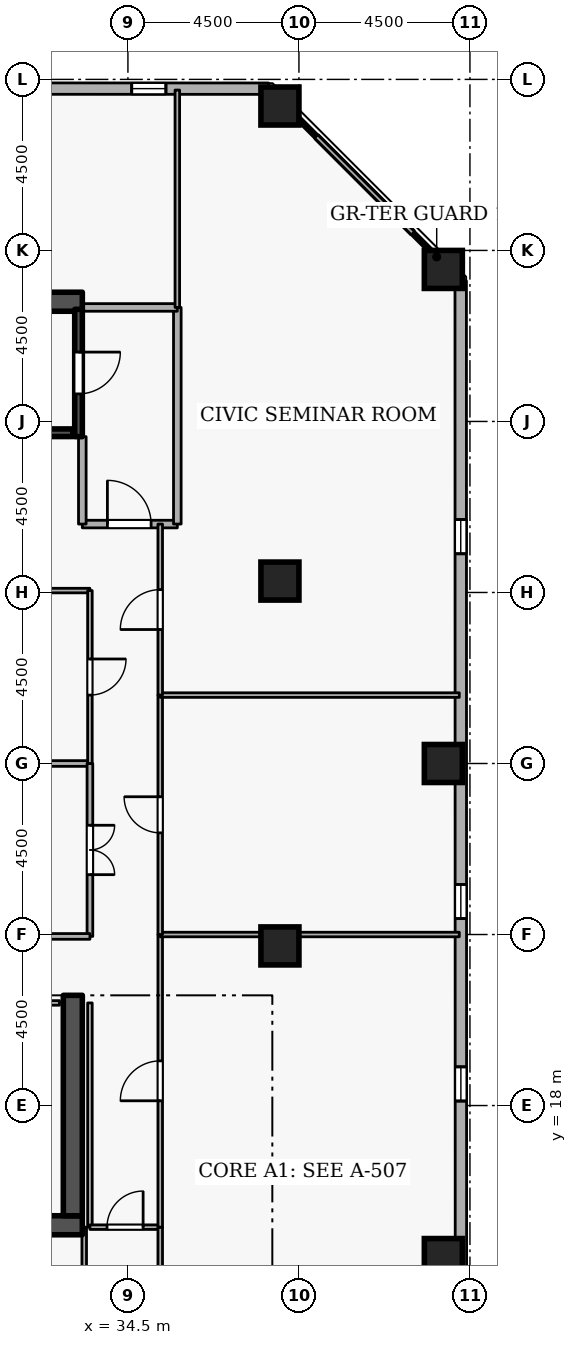
"""IFC4 building model, lengths in metres.
Left out: names, types, materials, properties, quantities, classifications, styles, units other than length and angle.
Written with IfcOpenShell. Run it as: python <this file> out.ifc"""

import sys

from ifc_helpers import new_model, si_unit, direction, frame, frame_2d, origin, origin_2d, place, context, subcontext, project, spatial, rectangle, extrude, element, fill, save


model = new_model("IFC4")
c1 = context("Model", 3, precision=1e-05, world=origin(), true_north=direction((0.0, 1.0)))
c2 = subcontext(c1, "Body", "Model", "MODEL_VIEW")
j1 = project(units=[si_unit("LENGTHUNIT", "METRE"), si_unit("PLANEANGLEUNIT", "RADIAN")], contexts=[c1])
p1 = place(None, origin())
s1 = spatial("IfcSite", under=j1, at=p1, CompositionType="ELEMENT")
p2 = place(p1, origin())
s2 = spatial("IfcBuilding", under=s1, at=p2, CompositionType="ELEMENT")
p3 = place(p2, frame((0.0, 0.0, 243.9)))
s3 = spatial("IfcBuildingStorey", under=s2, at=p3, CompositionType="ELEMENT", Elevation=243.9)
p4 = place(p3, frame((17.7, 14.85, 0.0), z_axis=(0.0, 0.0, 1.0), x_axis=(1.0, 0.0, 0.0)))
e1 = element("IfcWall", 1, at=p4, inside=s3, PredefinedType="SHEAR", context=c2, shape_type="SweptSolid", body=[
    extrude(rectangle(XDim=15.6, YDim=0.5, at=frame_2d((7.8, 0.0))), origin(), (0.0, 0.0, 1.0), 3.6),
])
p5 = place(p3, frame((33.05, 15.1, 0.0), z_axis=(0.0, 0.0, 1.0), x_axis=(0.0, 1.0, 0.0)))
e2 = element("IfcWall", 2, at=p5, inside=s3, PredefinedType="SHEAR", context=c2, shape_type="SweptSolid", body=[
    extrude(rectangle(XDim=5.8, YDim=0.5, at=frame_2d((2.9, 0.0))), origin(), (0.0, 0.0, 1.0), 3.6),
])
p6 = place(p3, frame((17.7, 39.15, 0.0), z_axis=(0.0, 0.0, 1.0), x_axis=(1.0, 0.0, 0.0)))
e3 = element("IfcWall", 3, at=p6, inside=s3, PredefinedType="SHEAR", context=c2, shape_type="SweptSolid", body=[
    extrude(rectangle(XDim=15.6, YDim=0.5, at=frame_2d((7.8, 0.0))), origin(), (0.0, 0.0, 1.0), 3.6),
])
for number, where, z_axis, x_axis in (
    (4, (42.8, 14.0, 0.0), (0.0, 0.0, 1.0), (1.0, 0.0, 0.0)),
    (5, (42.8, 27.0, 0.0), (0.0, 0.0, 1.0), (1.0, 0.0, 0.0)),
    (6, (42.8, 40.0, 0.0), (0.0, 0.0, 1.0), (1.0, 0.0, 0.0)),
    (7, (38.5, 44.3, 0.0), (0.0, 0.0, 1.0), (1.0, 0.0, 0.0)),
    (8, (38.5, 22.2, 0.0), (0.0, 0.0, 1.0), (1.0, 0.0, 0.0)),
    (9, (38.5, 31.8, 0.0), (0.0, 0.0, 1.0), (1.0, 0.0, 0.0)),
):
    element("IfcColumn", number, at=place(p3, frame(where, z_axis=z_axis, x_axis=x_axis)), inside=s3, PredefinedType="COLUMN", context=c2, shape_type="SweptSolid", body=[
        extrude(rectangle(XDim=1.0, YDim=1.0, at=origin_2d()), origin(), (0.0, 0.0, 1.0), 3.6),
    ])
p7 = place(p3, frame((43.265, 5.819, 0.0), z_axis=(0.0, 0.0, 1.0), x_axis=(-0.000244999128, 0.999999969988, 0.0)))
e10 = element("IfcWall", 10, at=p7, inside=s3, PredefinedType="STANDARD", context=c2, shape_type="SweptSolid", body=[
    extrude(rectangle(XDim=33.881, YDim=0.3, at=frame_2d((16.94, 0.0))), origin(), (0.0, 0.0, 1.0), 2.7),
])
p8 = place(p7, frame((2.7, 0.0, 0.72)))
e11 = element("IfcOpeningElement", 11, at=p8, cuts=e10, PredefinedType="OPENING", context=c2, shape_type="SweptSolid", body=[
    extrude(rectangle(XDim=0.9, YDim=1.75, at=frame_2d((0.45, 0.875))), frame((0.0, 0.16, 0.0), z_axis=(0.0, -1.0, 0.0), x_axis=(1.0, 0.0, 0.0)), (0.0, 0.0, 1.0), 0.32),
])
p9 = place(p7, frame((12.3, 0.0, 0.72)))
e12 = element("IfcOpeningElement", 12, at=p9, cuts=e10, PredefinedType="OPENING", context=c2, shape_type="SweptSolid", body=[
    extrude(rectangle(XDim=0.9, YDim=1.75, at=frame_2d((0.45, 0.875))), frame((0.0, 0.16, 0.0), z_axis=(0.0, -1.0, 0.0), x_axis=(1.0, 0.0, 0.0)), (0.0, 0.0, 1.0), 0.32),
])
p10 = place(p7, frame((17.1, 0.0, 0.72)))
e13 = element("IfcOpeningElement", 13, at=p10, cuts=e10, PredefinedType="OPENING", context=c2, shape_type="SweptSolid", body=[
    extrude(rectangle(XDim=0.9, YDim=1.75, at=frame_2d((0.45, 0.875))), frame((0.0, 0.16, 0.0), z_axis=(0.0, -1.0, 0.0), x_axis=(1.0, 0.0, 0.0)), (0.0, 0.0, 1.0), 0.32),
])
p11 = place(p7, frame((26.7, 0.0, 0.72)))
e14 = element("IfcOpeningElement", 14, at=p11, cuts=e10, PredefinedType="OPENING", context=c2, shape_type="SweptSolid", body=[
    extrude(rectangle(XDim=0.9, YDim=1.75, at=frame_2d((0.45, 0.875))), frame((0.0, 0.16, 0.0), z_axis=(0.0, -1.0, 0.0), x_axis=(1.0, 0.0, 0.0)), (0.0, 0.0, 1.0), 0.32),
])
p12 = place(p3, frame((38.199, 44.756, 0.0), z_axis=(0.0, 0.0, 1.0), x_axis=(-0.999999969988, 0.000244999128, 0.0)))
e15 = element("IfcWall", 15, at=p12, inside=s3, PredefinedType="STANDARD", context=c2, shape_type="SweptSolid", body=[
    extrude(rectangle(XDim=33.881, YDim=0.3, at=frame_2d((16.94, 0.0))), origin(), (0.0, 0.0, 1.0), 2.7),
])
p13 = place(p12, frame((2.7, 0.0, 0.72)))
e16 = element("IfcOpeningElement", 16, at=p13, cuts=e15, PredefinedType="OPENING", context=c2, shape_type="SweptSolid", body=[
    extrude(rectangle(XDim=0.9, YDim=1.75, at=frame_2d((0.45, 0.875))), frame((0.0, 0.16, 0.0), z_axis=(0.0, -1.0, 0.0), x_axis=(1.0, 0.0, 0.0)), (0.0, 0.0, 1.0), 0.32),
])
p14 = place(p12, frame((7.5, 0.0, 0.72)))
e17 = element("IfcOpeningElement", 17, at=p14, cuts=e15, PredefinedType="OPENING", context=c2, shape_type="SweptSolid", body=[
    extrude(rectangle(XDim=0.9, YDim=1.75, at=frame_2d((0.45, 0.875))), frame((0.0, 0.16, 0.0), z_axis=(0.0, -1.0, 0.0), x_axis=(1.0, 0.0, 0.0)), (0.0, 0.0, 1.0), 0.32),
])
p15 = place(p12, frame((17.1, 0.0, 0.72)))
e18 = element("IfcOpeningElement", 18, at=p15, cuts=e15, PredefinedType="OPENING", context=c2, shape_type="SweptSolid", body=[
    extrude(rectangle(XDim=0.9, YDim=1.75, at=frame_2d((0.45, 0.875))), frame((0.0, 0.16, 0.0), z_axis=(0.0, -1.0, 0.0), x_axis=(1.0, 0.0, 0.0)), (0.0, 0.0, 1.0), 0.32),
])
p16 = place(p3, frame((33.2, 38.95, 0.0), z_axis=(0.0, 0.0, 1.0), x_axis=(0.0, -1.0, 0.0)))
e19 = element("IfcWall", 19, at=p16, inside=s3, PredefinedType="SHEAR", context=c2, shape_type="SweptSolid", body=[
    extrude(rectangle(XDim=3.35, YDim=0.2, at=frame_2d((1.675, 0.0))), origin(), (0.0, 0.0, 1.0), 3.6),
])
p17 = place(p16, frame((1.125, 0.0, 0.0)))
e20 = element("IfcOpeningElement", 20, at=p17, cuts=e19, PredefinedType="OPENING", context=c2, shape_type="SweptSolid", body=[
    extrude(rectangle(XDim=1.1, YDim=2.1, at=frame_2d((0.55, 1.05))), frame((0.0, 0.11, 0.0), z_axis=(0.0, -1.0, 0.0), x_axis=(1.0, 0.0, 0.0)), (0.0, 0.0, 1.0), 0.22),
])
p18 = place(p3, frame((25.95, 35.703, 0.0), z_axis=(0.0, 0.0, 1.0), x_axis=(1.0, 0.0, 0.0)))
e21 = element("IfcWall", 21, at=p18, inside=s3, PredefinedType="SHEAR", context=c2, shape_type="SweptSolid", body=[
    extrude(rectangle(XDim=7.1, YDim=0.2, at=frame_2d((3.55, 0.0))), origin(), (0.0, 0.0, 1.0), 3.6),
])
p19 = place(p3, frame((33.3, 33.3, 0.0), z_axis=(0.0, 0.0, 1.0), x_axis=(1.0, 0.0, 0.0)))
e22 = element("IfcWall", 22, at=p19, inside=s3, PredefinedType="STANDARD", context=c2, shape_type="SweptSolid", body=[
    extrude(rectangle(XDim=2.5, YDim=0.2, at=frame_2d((1.25, 0.0))), origin(), (0.0, 0.0, 1.0), 3.34),
])
p20 = place(p19, frame((0.66, 0.0, 0.0)))
e23 = element("IfcOpeningElement", 23, at=p20, cuts=e22, PredefinedType="OPENING", context=c2, shape_type="SweptSolid", body=[
    extrude(rectangle(XDim=1.15, YDim=2.1, at=frame_2d((0.575, 1.05))), frame((0.0, 0.11, 0.0), z_axis=(0.0, -1.0, 0.0), x_axis=(1.0, 0.0, 0.0)), (0.0, 0.0, 1.0), 0.22),
])
p21 = place(p3, frame((35.8, 33.3, 0.0), z_axis=(0.0, 0.0, 1.0), x_axis=(0.0, 1.0, 0.0)))
e24 = element("IfcWall", 24, at=p21, inside=s3, PredefinedType="STANDARD", context=c2, shape_type="SweptSolid", body=[
    extrude(rectangle(XDim=5.7, YDim=0.2, at=frame_2d((2.85, 0.0))), origin(), (0.0, 0.0, 1.0), 3.34),
])
p22 = place(p3, frame((35.8, 39.0, 0.0), z_axis=(0.0, 0.0, 1.0), x_axis=(-1.0, 0.0, 0.0)))
e25 = element("IfcWall", 25, at=p22, inside=s3, PredefinedType="STANDARD", context=c2, shape_type="SweptSolid", body=[
    extrude(rectangle(XDim=2.5, YDim=0.2, at=frame_2d((1.25, 0.0))), origin(), (0.0, 0.0, 1.0), 3.34),
])
p23 = place(p3, frame((33.3, 35.6, 0.0), z_axis=(0.0, 0.0, 1.0), x_axis=(0.0, -1.0, 0.0)))
e26 = element("IfcWall", 26, at=p23, inside=s3, PredefinedType="STANDARD", context=c2, shape_type="SweptSolid", body=[
    extrude(rectangle(XDim=2.3, YDim=0.2, at=frame_2d((1.15, 0.0))), origin(), (0.0, 0.0, 1.0), 2.545),
])
p24 = place(p3, frame((30.6, 20.7, 0.0), z_axis=(0.0, 0.0, 1.0), x_axis=(1.0, 0.0, 0.0)))
e27 = element("IfcWall", 27, at=p24, inside=s3, PredefinedType="PARTITIONING", context=c2, shape_type="SweptSolid", body=[
    extrude(rectangle(XDim=2.1, YDim=0.12, at=frame_2d((1.05, 0.0))), origin(), (0.0, 0.0, 1.0), 3.34),
])
p25 = place(p24, frame((0.575, 0.0, 0.0)))
e28 = element("IfcOpeningElement", 28, at=p25, cuts=e27, PredefinedType="OPENING", context=c2, shape_type="SweptSolid", body=[
    extrude(rectangle(XDim=0.95, YDim=2.1, at=frame_2d((0.475, 1.05))), frame((0.0, 0.07, 0.0), z_axis=(0.0, -1.0, 0.0), x_axis=(1.0, 0.0, 0.0)), (0.0, 0.0, 1.0), 0.14),
])
p26 = place(p3, frame((33.5, 20.7, 0.0), z_axis=(0.0, 0.0, 1.0), x_axis=(0.0, -1.0, 0.0)))
e29 = element("IfcWall", 29, at=p26, inside=s3, PredefinedType="PARTITIONING", context=c2, shape_type="SweptSolid", body=[
    extrude(rectangle(XDim=5.9, YDim=0.12, at=frame_2d((2.95, 0.0))), origin(), (0.0, 0.0, 1.0), 3.34),
])
p27 = place(p3, frame((33.5, 14.8, 0.0), z_axis=(0.0, 0.0, 1.0), x_axis=(1.0, 0.0, 0.0)))
e30 = element("IfcWall", 30, at=p27, inside=s3, PredefinedType="PARTITIONING", context=c2, shape_type="SweptSolid", body=[
    extrude(rectangle(XDim=1.85, YDim=0.12, at=frame_2d((0.925, 0.0))), origin(), (0.0, 0.0, 1.0), 3.34),
])
p28 = place(p27, frame((0.45, 0.0, 0.0)))
e31 = element("IfcOpeningElement", 31, at=p28, cuts=e30, PredefinedType="OPENING", context=c2, shape_type="SweptSolid", body=[
    extrude(rectangle(XDim=0.95, YDim=2.1, at=frame_2d((0.475, 1.05))), frame((0.0, 0.07, 0.0), z_axis=(0.0, -1.0, 0.0), x_axis=(1.0, 0.0, 0.0)), (0.0, 0.0, 1.0), 0.14),
])
for number, where, z_axis, x_axis in (
    (32, (35.35, 14.8, 0.0), (0.0, 0.0, 1.0), (0.0, -1.0, 0.0)),
    (33, (33.35, 3.28, 0.0), (0.0, 0.0, 1.0), (0.0, 1.0, 0.0)),
):
    element("IfcWall", number, at=place(p3, frame(where, z_axis=z_axis, x_axis=x_axis)), inside=s3, PredefinedType="PARTITIONING", context=c2, shape_type="SweptSolid", body=[
        extrude(rectangle(XDim=11.52, YDim=0.12, at=frame_2d((5.76, 0.0))), origin(), (0.0, 0.0, 1.0), 3.34),
    ])
p29 = place(p3, frame((35.35, 14.8, 0.0), z_axis=(0.0, 0.0, 1.0), x_axis=(0.0, 1.0, 0.0)))
e34 = element("IfcWall", 34, at=p29, inside=s3, PredefinedType="PARTITIONING", context=c2, shape_type="SweptSolid", body=[
    extrude(rectangle(XDim=7.7, YDim=0.12, at=frame_2d((3.85, 0.0))), origin(), (0.0, 0.0, 1.0), 3.34),
])
p30 = place(p29, frame((3.325, 0.0, 0.0)))
e35 = element("IfcOpeningElement", 35, at=p30, cuts=e34, PredefinedType="OPENING", context=c2, shape_type="SweptSolid", body=[
    extrude(rectangle(XDim=1.05, YDim=2.1, at=frame_2d((0.525, 1.05))), frame((0.0, 0.07, 0.0), z_axis=(0.0, -1.0, 0.0), x_axis=(1.0, 0.0, 0.0)), (0.0, 0.0, 1.0), 0.14),
])
p31 = place(p3, frame((35.35, 22.5, 0.0), z_axis=(0.0, 0.0, 1.0), x_axis=(1.0, 0.0, 0.0)))
e36 = element("IfcWall", 36, at=p31, inside=s3, PredefinedType="PARTITIONING", context=c2, shape_type="SweptSolid", body=[
    extrude(rectangle(XDim=7.87, YDim=0.12, at=frame_2d((3.935, 0.0))), origin(), (0.0, 0.0, 1.0), 3.34),
])
p32 = place(p3, frame((35.35, 22.5, 0.0), z_axis=(0.0, 0.0, 1.0), x_axis=(0.0, 1.0, 0.0)))
e37 = element("IfcWall", 37, at=p32, inside=s3, PredefinedType="PARTITIONING", context=c2, shape_type="SweptSolid", body=[
    extrude(rectangle(XDim=6.3, YDim=0.12, at=frame_2d((3.15, 0.0))), origin(), (0.0, 0.0, 1.0), 3.34),
])
p33 = place(p32, frame((2.675, 0.0, 0.0)))
e38 = element("IfcOpeningElement", 38, at=p33, cuts=e37, PredefinedType="OPENING", context=c2, shape_type="SweptSolid", body=[
    extrude(rectangle(XDim=0.95, YDim=2.1, at=frame_2d((0.475, 1.05))), frame((0.0, 0.07, 0.0), z_axis=(0.0, -1.0, 0.0), x_axis=(1.0, 0.0, 0.0)), (0.0, 0.0, 1.0), 0.14),
])
p34 = place(p3, frame((35.35, 28.8, 0.0), z_axis=(0.0, 0.0, 1.0), x_axis=(1.0, 0.0, 0.0)))
e39 = element("IfcWall", 39, at=p34, inside=s3, PredefinedType="PARTITIONING", context=c2, shape_type="SweptSolid", body=[
    extrude(rectangle(XDim=7.87, YDim=0.12, at=frame_2d((3.935, 0.0))), origin(), (0.0, 0.0, 1.0), 3.34),
])
p35 = place(p3, frame((35.8, 39.0, 0.0), z_axis=(0.0, 0.0, 1.0), x_axis=(0.0, 1.0, 0.0)))
e40 = element("IfcWall", 40, at=p35, inside=s3, PredefinedType="PARTITIONING", context=c2, shape_type="SweptSolid", body=[
    extrude(rectangle(XDim=5.72, YDim=0.12, at=frame_2d((2.86, 0.0))), origin(), (0.0, 0.0, 1.0), 3.34),
])
p36 = place(p3, frame((38.233, 44.72, 0.0), z_axis=(0.0, 0.0, 1.0), x_axis=(0.707106781187, -0.707106781187, 0.0)))
e41 = element("IfcWall", 41, at=p36, inside=s3, PredefinedType="PARTITIONING", context=c2, shape_type="SweptSolid", body=[
    extrude(rectangle(XDim=7.052, YDim=0.12, at=frame_2d((3.526, 0.0))), origin(), (0.0, 0.0, 1.0), 3.34),
])
p37 = place(p3, frame((35.35, 28.8, 0.0), z_axis=(0.0, 0.0, 1.0), x_axis=(0.0, 1.0, 0.0)))
e42 = element("IfcWall", 42, at=p37, inside=s3, PredefinedType="PARTITIONING", context=c2, shape_type="SweptSolid", body=[
    extrude(rectangle(XDim=4.5, YDim=0.12, at=frame_2d((2.25, 0.0))), origin(), (0.0, 0.0, 1.0), 3.34),
])
p38 = place(p37, frame((1.725, 0.0, 0.0)))
e43 = element("IfcOpeningElement", 43, at=p38, cuts=e42, PredefinedType="OPENING", context=c2, shape_type="SweptSolid", body=[
    extrude(rectangle(XDim=1.05, YDim=2.1, at=frame_2d((0.525, 1.05))), frame((0.0, 0.07, 0.0), z_axis=(0.0, -1.0, 0.0), x_axis=(1.0, 0.0, 0.0)), (0.0, 0.0, 1.0), 0.14),
])
p39 = place(p3, frame((30.7, 27.0, 0.0), z_axis=(0.0, 0.0, 1.0), x_axis=(1.0, 0.0, 0.0)))
e44 = element("IfcWall", 44, at=p39, inside=s3, PredefinedType="PARTITIONING", context=c2, shape_type="SweptSolid", body=[
    extrude(rectangle(XDim=2.8, YDim=0.15, at=frame_2d((1.4, 0.0))), origin(), (0.0, 0.0, 1.0), 2.878),
])
p40 = place(p3, frame((33.5, 27.0, 0.0), z_axis=(0.0, 0.0, 1.0), x_axis=(0.0, -1.0, 0.0)))
e45 = element("IfcWall", 45, at=p40, inside=s3, PredefinedType="PARTITIONING", context=c2, shape_type="SweptSolid", body=[
    extrude(rectangle(XDim=4.55, YDim=0.15, at=frame_2d((2.275, 0.0))), origin(), (0.0, 0.0, 1.0), 3.34),
])
p41 = place(p40, frame((1.625, 0.0, 0.0)))
e46 = element("IfcOpeningElement", 46, at=p41, cuts=e45, PredefinedType="OPENING", context=c2, shape_type="SweptSolid", body=[
    extrude(rectangle(XDim=1.3, YDim=2.12, at=frame_2d((0.65, 1.06))), frame((0.0, 0.085, 0.0), z_axis=(0.0, -1.0, 0.0), x_axis=(1.0, 0.0, 0.0)), (0.0, 0.0, 1.0), 0.17),
])
p42 = place(p3, frame((33.5, 22.45, 0.0), z_axis=(0.0, 0.0, 1.0), x_axis=(-1.0, 0.0, 0.0)))
e47 = element("IfcWall", 47, at=p42, inside=s3, PredefinedType="PARTITIONING", context=c2, shape_type="SweptSolid", body=[
    extrude(rectangle(XDim=2.8, YDim=0.15, at=frame_2d((1.4, 0.0))), origin(), (0.0, 0.0, 1.0), 3.34),
])
p43 = place(p3, frame((30.7, 31.55, 0.0), z_axis=(0.0, 0.0, 1.0), x_axis=(1.0, 0.0, 0.0)))
e48 = element("IfcWall", 48, at=p43, inside=s3, PredefinedType="PARTITIONING", context=c2, shape_type="SweptSolid", body=[
    extrude(rectangle(XDim=2.8, YDim=0.12, at=frame_2d((1.4, 0.0))), origin(), (0.0, 0.0, 1.0), 3.34),
])
p44 = place(p3, frame((33.5, 31.55, 0.0), z_axis=(0.0, 0.0, 1.0), x_axis=(0.0, -1.0, 0.0)))
e49 = element("IfcWall", 49, at=p44, inside=s3, PredefinedType="PARTITIONING", context=c2, shape_type="SweptSolid", body=[
    extrude(rectangle(XDim=4.55, YDim=0.12, at=frame_2d((2.275, 0.0))), origin(), (0.0, 0.0, 1.0), 3.34),
])
p45 = place(p44, frame((1.8, 0.0, 0.0)))
e50 = element("IfcOpeningElement", 50, at=p45, cuts=e49, PredefinedType="OPENING", context=c2, shape_type="SweptSolid", body=[
    extrude(rectangle(XDim=0.95, YDim=2.1, at=frame_2d((0.475, 1.05))), frame((0.0, 0.07, 0.0), z_axis=(0.0, -1.0, 0.0), x_axis=(1.0, 0.0, 0.0)), (0.0, 0.0, 1.0), 0.14),
])
p46 = place(p9, origin())
e51 = element("IfcWindow", 51, at=p46, inside=s3, PartitioningType="SINGLE_PANEL", PredefinedType="WINDOW", context=c2, shape_type="SweptSolid", body=[
    extrude(rectangle(XDim=0.9, YDim=1.75, at=frame_2d((0.45, 0.875))), frame((0.0, 0.03, 0.0), z_axis=(0.0, -1.0, 0.0), x_axis=(1.0, 0.0, 0.0)), (0.0, 0.0, 1.0), 0.06),
])
fill(e12, e51)
p47 = place(p10, origin())
e52 = element("IfcWindow", 52, at=p47, inside=s3, PartitioningType="SINGLE_PANEL", PredefinedType="WINDOW", context=c2, shape_type="SweptSolid", body=[
    extrude(rectangle(XDim=0.9, YDim=1.75, at=frame_2d((0.45, 0.875))), frame((0.0, 0.03, 0.0), z_axis=(0.0, -1.0, 0.0), x_axis=(1.0, 0.0, 0.0)), (0.0, 0.0, 1.0), 0.06),
])
fill(e13, e52)
p48 = place(p11, origin())
e53 = element("IfcWindow", 53, at=p48, inside=s3, PartitioningType="SINGLE_PANEL", PredefinedType="WINDOW", context=c2, shape_type="SweptSolid", body=[
    extrude(rectangle(XDim=0.9, YDim=1.75, at=frame_2d((0.45, 0.875))), frame((0.0, 0.03, 0.0), z_axis=(0.0, -1.0, 0.0), x_axis=(1.0, 0.0, 0.0)), (0.0, 0.0, 1.0), 0.06),
])
fill(e14, e53)
p49 = place(p13, origin())
e54 = element("IfcWindow", 54, at=p49, inside=s3, PartitioningType="SINGLE_PANEL", PredefinedType="WINDOW", context=c2, shape_type="SweptSolid", body=[
    extrude(rectangle(XDim=0.9, YDim=1.75, at=frame_2d((0.45, 0.875))), frame((0.0, 0.03, 0.0), z_axis=(0.0, -1.0, 0.0), x_axis=(1.0, 0.0, 0.0)), (0.0, 0.0, 1.0), 0.06),
])
fill(e16, e54)
p50 = place(p17, origin())
e55 = element("IfcDoor", 55, at=p50, inside=s3, OperationType="SINGLE_SWING_LEFT", PredefinedType="DOOR", context=c2, shape_type="SweptSolid", body=[
    extrude(rectangle(XDim=1.1, YDim=2.1, at=frame_2d((0.55, 1.05))), frame((0.0, 0.025, 0.0), z_axis=(0.0, -1.0, 0.0), x_axis=(1.0, 0.0, 0.0)), (0.0, 0.0, 1.0), 0.05),
])
fill(e20, e55)
p51 = place(p20, origin())
e56 = element("IfcDoor", 56, at=p51, inside=s3, OperationType="SINGLE_SWING_LEFT", PredefinedType="DOOR", context=c2, shape_type="SweptSolid", body=[
    extrude(rectangle(XDim=1.15, YDim=2.1, at=frame_2d((0.575, 1.05))), frame((0.0, 0.025, 0.0), z_axis=(0.0, -1.0, 0.0), x_axis=(1.0, 0.0, 0.0)), (0.0, 0.0, 1.0), 0.05),
])
fill(e23, e56)
p52 = place(p28, origin())
e57 = element("IfcDoor", 57, at=p52, inside=s3, OperationType="SINGLE_SWING_RIGHT", PredefinedType="DOOR", context=c2, shape_type="SweptSolid", body=[
    extrude(rectangle(XDim=0.95, YDim=2.1, at=frame_2d((0.475, 1.05))), frame((0.0, 0.025, 0.0), z_axis=(0.0, -1.0, 0.0), x_axis=(1.0, 0.0, 0.0)), (0.0, 0.0, 1.0), 0.05),
])
fill(e31, e57)
p53 = place(p30, origin())
e58 = element("IfcDoor", 58, at=p53, inside=s3, OperationType="SINGLE_SWING_LEFT", PredefinedType="DOOR", context=c2, shape_type="SweptSolid", body=[
    extrude(rectangle(XDim=1.05, YDim=2.1, at=frame_2d((0.525, 1.05))), frame((0.0, 0.025, 0.0), z_axis=(0.0, -1.0, 0.0), x_axis=(1.0, 0.0, 0.0)), (0.0, 0.0, 1.0), 0.05),
])
fill(e35, e58)
p54 = place(p33, origin())
e59 = element("IfcDoor", 59, at=p54, inside=s3, OperationType="SINGLE_SWING_RIGHT", PredefinedType="DOOR", context=c2, shape_type="SweptSolid", body=[
    extrude(rectangle(XDim=0.95, YDim=2.1, at=frame_2d((0.475, 1.05))), frame((0.0, 0.025, 0.0), z_axis=(0.0, -1.0, 0.0), x_axis=(1.0, 0.0, 0.0)), (0.0, 0.0, 1.0), 0.05),
])
fill(e38, e59)
p55 = place(p38, origin())
e60 = element("IfcDoor", 60, at=p55, inside=s3, OperationType="SINGLE_SWING_LEFT", PredefinedType="DOOR", context=c2, shape_type="SweptSolid", body=[
    extrude(rectangle(XDim=1.05, YDim=2.1, at=frame_2d((0.525, 1.05))), frame((0.0, 0.025, 0.0), z_axis=(0.0, -1.0, 0.0), x_axis=(1.0, 0.0, 0.0)), (0.0, 0.0, 1.0), 0.05),
])
fill(e43, e60)
p56 = place(p41, origin())
e61 = element("IfcDoor", 61, at=p56, inside=s3, OperationType="DOUBLE_DOOR_SINGLE_SWING", PredefinedType="DOOR", context=c2, shape_type="SweptSolid", body=[
    extrude(rectangle(XDim=1.3, YDim=2.12, at=frame_2d((0.65, 1.06))), frame((0.0, 0.025, 0.0), z_axis=(0.0, -1.0, 0.0), x_axis=(1.0, 0.0, 0.0)), (0.0, 0.0, 1.0), 0.05),
])
fill(e46, e61)
p57 = place(p45, origin())
e62 = element("IfcDoor", 62, at=p57, inside=s3, OperationType="SINGLE_SWING_LEFT", PredefinedType="DOOR", context=c2, shape_type="SweptSolid", body=[
    extrude(rectangle(XDim=0.95, YDim=2.1, at=frame_2d((0.475, 1.05))), frame((0.0, 0.025, 0.0), z_axis=(0.0, -1.0, 0.0), x_axis=(1.0, 0.0, 0.0)), (0.0, 0.0, 1.0), 0.05),
])
fill(e50, e62)
save(model, sys.argv[1])
